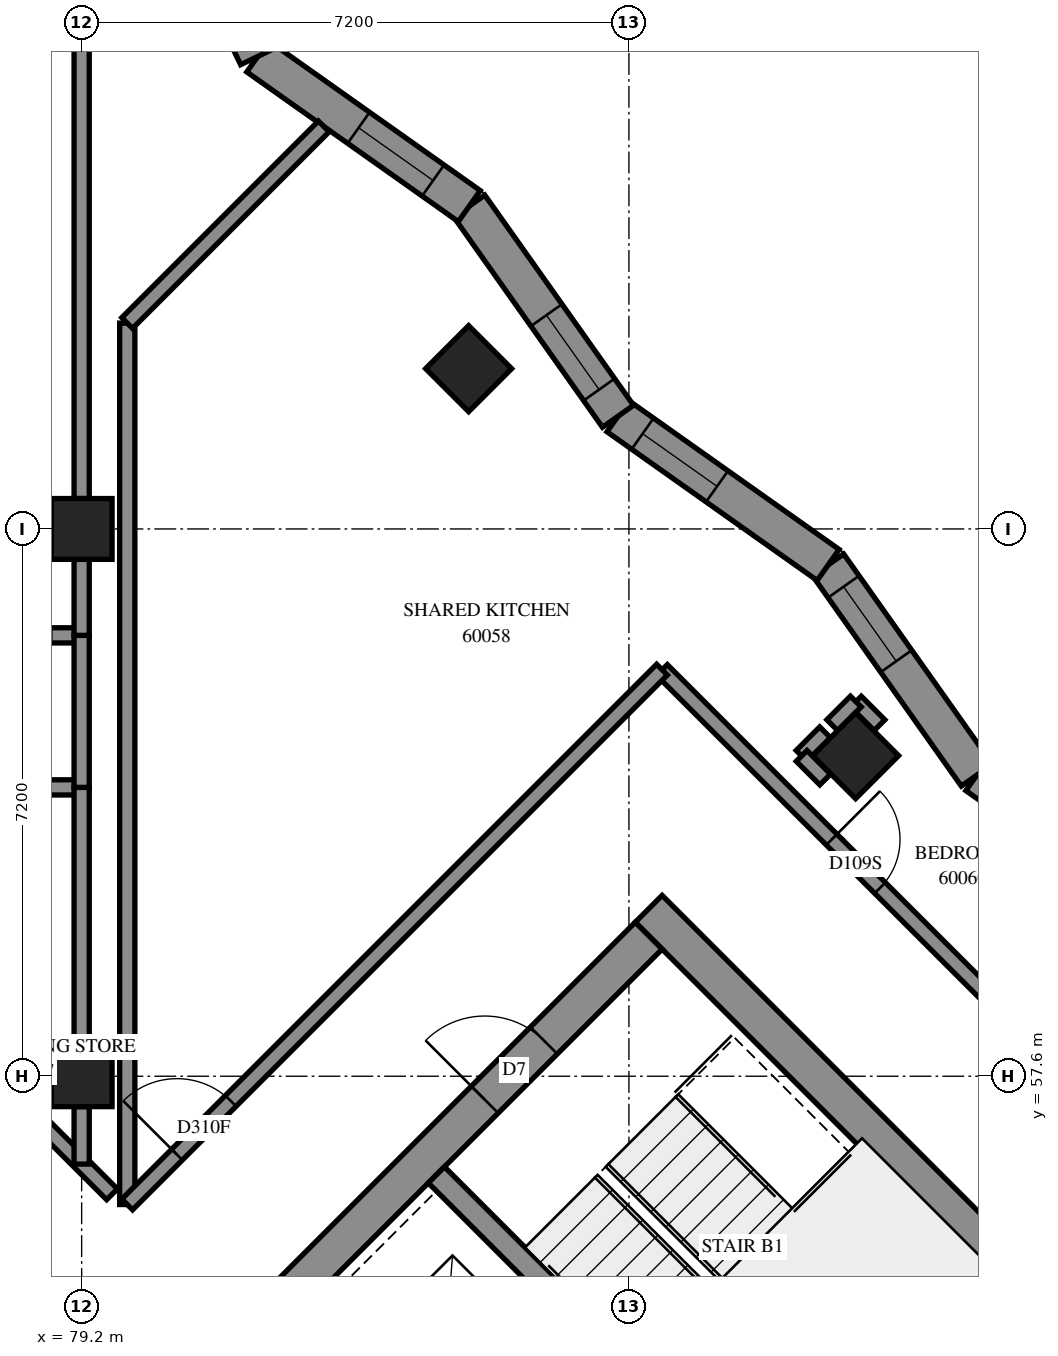
"""IFC4 building model, lengths in metres.
Left out: names, types, materials, properties, quantities, classifications, styles, units other than length and angle.
Written with IfcOpenShell. Run it as: python <this file> out.ifc"""

import sys

from ifc_helpers import new_model, si_unit, direction, frame, frame_2d, origin, origin_2d, place, context, subcontext, project, spatial, polyline, rectangle, outline, extrude, element, fill, save


model = new_model("IFC4")
c1 = context("Model", 3, precision=1e-05, world=origin(), true_north=direction((0.0, 1.0)))
c2 = subcontext(c1, "Body", "Model", "MODEL_VIEW")
j1 = project(units=[si_unit("LENGTHUNIT", "METRE"), si_unit("PLANEANGLEUNIT", "RADIAN")], contexts=[c1])
p1 = place(None, origin())
s1 = spatial("IfcSite", under=j1, at=p1, CompositionType="ELEMENT")
p2 = place(p1, origin())
s2 = spatial("IfcBuilding", under=s1, at=p2, CompositionType="ELEMENT")
p3 = place(p2, frame((0.0, 0.0, 220.2)))
s3 = spatial("IfcBuildingStorey", under=s2, at=p3, CompositionType="ELEMENT", Elevation=220.2)
for number, where, z_axis, x_axis in (
    (1, (79.2, 57.6, 0.0), (0.0, 0.0, 1.0), (1.0, 0.0, 0.0)),
    (2, (79.2, 64.8, 0.0), (0.0, 0.0, 1.0), (1.0, 0.0, 0.0)),
    (3, (84.291, 66.909, 0.0), (0.0, 0.0, 1.0), (0.707, -0.707, 0.0)),
    (4, (89.382, 61.818, 0.0), (0.0, 0.0, 1.0), (0.707, -0.707, 0.0)),
):
    element("IfcColumn", number, at=place(p3, frame(where, z_axis=z_axis, x_axis=x_axis)), inside=s3, PredefinedType="COLUMN", context=c2, shape_type="SweptSolid", body=[
        extrude(rectangle(XDim=0.8, YDim=0.8, at=origin_2d()), origin(), (0.0, 0.0, 1.0), 3.1),
    ])
p4 = place(p3, frame((86.66, 59.802, -0.3), z_axis=(0.0, 0.0, 1.0), x_axis=(0.7071067812, -0.7071067812, 0.0)))
e5 = element("IfcWall", 5, at=p4, inside=s3, PredefinedType="SHEAR", context=c2, shape_type="SweptSolid", body=[
    extrude(rectangle(XDim=15.4, YDim=0.5, at=frame_2d((7.7, 0.0))), origin(), (0.0, 0.0, 1.0), 2.7),
])
p5 = place(p4, frame((10.5, 0.0, 0.3)))
e6 = element("IfcOpeningElement", 6, at=p5, cuts=e5, PredefinedType="OPENING", context=c2, shape_type="SweptSolid", body=[
    extrude(rectangle(XDim=0.8, YDim=2.1, at=frame_2d((0.4, 1.05))), frame((0.0, 0.26, 0.0), z_axis=(0.0, -1.0, 0.0), x_axis=(1.0, 0.0, 0.0)), (0.0, 0.0, 1.0), 0.52),
])
p6 = place(p3, frame((76.478, 49.267, -0.3), z_axis=(0.0, 0.0, 1.0), x_axis=(0.7071067812, 0.7071067812, 0.0)))
e7 = element("IfcWall", 7, at=p6, inside=s3, PredefinedType="SHEAR", context=c2, shape_type="SweptSolid", body=[
    extrude(rectangle(XDim=14.4, YDim=0.5, at=frame_2d((7.2, 0.0))), origin(), (0.0, 0.0, 1.0), 2.7),
])
p7 = place(p6, frame((4.55, 0.0, 0.3)))
e8 = element("IfcOpeningElement", 8, at=p7, cuts=e7, PredefinedType="OPENING", context=c2, shape_type="SweptSolid", body=[
    extrude(rectangle(XDim=1.1, YDim=2.1, at=frame_2d((0.55, 1.05))), frame((0.0, 0.26, 0.0), z_axis=(0.0, -1.0, 0.0), x_axis=(1.0, 0.0, 0.0)), (0.0, 0.0, 1.0), 0.52),
])
p8 = place(p6, frame((11.35, 0.0, 0.3)))
e9 = element("IfcOpeningElement", 9, at=p8, cuts=e7, PredefinedType="OPENING", context=c2, shape_type="SweptSolid", body=[
    extrude(rectangle(XDim=1.1, YDim=2.1, at=frame_2d((0.55, 1.05))), frame((0.0, 0.26, 0.0), z_axis=(0.0, -1.0, 0.0), x_axis=(1.0, 0.0, 0.0)), (0.0, 0.0, 1.0), 0.52),
])
p9 = place(p3, frame((83.867, 56.302, 0.0), z_axis=(0.0, 0.0, 1.0), x_axis=(0.7071137256, -0.7070998367, 0.0)))
e10 = element("IfcWall", 10, at=p9, inside=s3, PredefinedType="SOLIDWALL", context=c2, shape_type="SweptSolid", body=[
    extrude(rectangle(XDim=7.2, YDim=0.3, at=frame_2d((3.6, 0.0))), origin(), (0.0, 0.0, 1.0), 3.1),
])
p10 = place(p3, frame((93.742, 59.605, 0.0), z_axis=(0.0, 0.0, 1.0), x_axis=(-0.8163684441, 0.5775314394, 0.0)))
e11 = element("IfcWall", 11, at=p10, inside=s3, PredefinedType="SOLIDWALL", context=c2, shape_type="SweptSolid", body=[
    extrude(outline(polyline([(-0.043, -0.25), (3.344, -0.25), (3.43, 0.25), (0.043, 0.25), (-0.043, -0.25)])), origin(), (0.0, 0.0, 1.0), 3.1),
])
p11 = place(p10, frame((1.525, 0.0, 0.45)))
e12 = element("IfcOpeningElement", 12, at=p11, cuts=e11, PredefinedType="OPENING", context=c2, shape_type="SweptSolid", body=[
    extrude(rectangle(XDim=1.2, YDim=2.5, at=frame_2d((0.6, 1.25))), frame((0.0, 0.26, 0.0), z_axis=(0.0, -1.0, 0.0), x_axis=(1.0, 0.0, 0.0)), (0.0, 0.0, 1.0), 0.52),
])
p12 = place(p3, frame((90.977, 61.561, 0.0), z_axis=(0.0, 0.0, 1.0), x_axis=(-0.5775371961, 0.8163643715, 0.0)))
e13 = element("IfcWall", 13, at=p12, inside=s3, PredefinedType="SOLIDWALL", context=c2, shape_type="SweptSolid", body=[
    extrude(outline(polyline([(0.043, -0.25), (3.43, -0.25), (3.344, 0.25), (-0.043, 0.25), (0.043, -0.25)])), origin(), (0.0, 0.0, 1.0), 3.1),
])
p13 = place(p12, frame((1.836, 0.0, 0.45)))
e14 = element("IfcOpeningElement", 14, at=p13, cuts=e13, PredefinedType="OPENING", context=c2, shape_type="SweptSolid", body=[
    extrude(rectangle(XDim=1.2, YDim=2.5, at=frame_2d((0.6, 1.25))), frame((0.0, 0.26, 0.0), z_axis=(0.0, -1.0, 0.0), x_axis=(1.0, 0.0, 0.0)), (0.0, 0.0, 1.0), 0.52),
])
p14 = place(p3, frame((89.021, 64.326, 0.0), z_axis=(0.0, 0.0, 1.0), x_axis=(-0.8163684441, 0.5775314394, 0.0)))
e15 = element("IfcWall", 15, at=p14, inside=s3, PredefinedType="SOLIDWALL", context=c2, shape_type="SweptSolid", body=[
    extrude(outline(polyline([(-0.043, -0.25), (3.344, -0.25), (3.43, 0.25), (0.043, 0.25), (-0.043, -0.25)])), origin(), (0.0, 0.0, 1.0), 3.1),
])
p15 = place(p14, frame((1.79, 0.0, 0.45)))
e16 = element("IfcOpeningElement", 16, at=p15, cuts=e15, PredefinedType="OPENING", context=c2, shape_type="SweptSolid", body=[
    extrude(rectangle(XDim=1.2, YDim=2.5, at=frame_2d((0.6, 1.25))), frame((0.0, 0.26, 0.0), z_axis=(0.0, -1.0, 0.0), x_axis=(1.0, 0.0, 0.0)), (0.0, 0.0, 1.0), 0.52),
])
p16 = place(p3, frame((86.256, 66.282, 0.0), z_axis=(0.0, 0.0, 1.0), x_axis=(-0.5775371961, 0.8163643715, 0.0)))
e17 = element("IfcWall", 17, at=p16, inside=s3, PredefinedType="SOLIDWALL", context=c2, shape_type="SweptSolid", body=[
    extrude(outline(polyline([(0.043, -0.25), (3.43, -0.25), (3.344, 0.25), (-0.043, 0.25), (0.043, -0.25)])), origin(), (0.0, 0.0, 1.0), 3.1),
])
p17 = place(p16, frame((0.429, 0.0, 0.45)))
e18 = element("IfcOpeningElement", 18, at=p17, cuts=e17, PredefinedType="OPENING", context=c2, shape_type="SweptSolid", body=[
    extrude(rectangle(XDim=1.2, YDim=2.5, at=frame_2d((0.6, 1.25))), frame((0.0, 0.26, 0.0), z_axis=(0.0, -1.0, 0.0), x_axis=(1.0, 0.0, 0.0)), (0.0, 0.0, 1.0), 0.52),
])
p18 = place(p3, frame((84.3, 69.047, 0.0), z_axis=(0.0, 0.0, 1.0), x_axis=(-0.8163731348, 0.5775248088, 0.0)))
e19 = element("IfcWall", 19, at=p18, inside=s3, PredefinedType="SOLIDWALL", context=c2, shape_type="SweptSolid", body=[
    extrude(outline(polyline([(-0.043, -0.25), (3.344, -0.25), (3.474, 0.25), (0.043, 0.25), (-0.043, -0.25)])), origin(), (0.0, 0.0, 1.0), 3.1),
])
p19 = place(p18, frame((0.584, 0.0, 0.45)))
e20 = element("IfcOpeningElement", 20, at=p19, cuts=e19, PredefinedType="OPENING", context=c2, shape_type="SweptSolid", body=[
    extrude(rectangle(XDim=1.2, YDim=2.5, at=frame_2d((0.6, 1.25))), frame((0.0, 0.26, 0.0), z_axis=(0.0, -1.0, 0.0), x_axis=(1.0, 0.0, 0.0)), (0.0, 0.0, 1.0), 0.52),
])
p20 = place(p3, frame((81.517, 71.016, 0.0), z_axis=(0.0, 0.0, 1.0), x_axis=(-0.4329306404, 0.9014272353, 0.0)))
e21 = element("IfcWall", 21, at=p20, inside=s3, PredefinedType="SOLIDWALL", context=c2, shape_type="SweptSolid", body=[
    extrude(outline(polyline([(0.065, -0.25), (3.603, -0.25), (3.173, 0.25), (-0.065, 0.25), (0.065, -0.25)])), origin(), (0.0, 0.0, 1.0), 3.1),
])
p21 = place(p20, frame((0.737, 0.0, 0.45)))
e22 = element("IfcOpeningElement", 22, at=p21, cuts=e21, PredefinedType="OPENING", context=c2, shape_type="SweptSolid", body=[
    extrude(rectangle(XDim=1.2, YDim=2.5, at=frame_2d((0.6, 1.25))), frame((0.0, 0.26, 0.0), z_axis=(0.0, -1.0, 0.0), x_axis=(1.0, 0.0, 0.0)), (0.0, 0.0, 1.0), 0.52),
])
p22 = place(p3, frame((86.835, 62.945, 0.0), z_axis=(0.0, 0.0, 1.0), x_axis=(0.7072533434, -0.7069601886, 0.0)))
e23 = element("IfcWall", 23, at=p22, inside=s3, PredefinedType="PARTITIONING", context=c2, shape_type="SweptSolid", body=[
    extrude(rectangle(XDim=11.598, YDim=0.2, at=frame_2d((5.799, 0.0))), origin(), (0.0, 0.0, 1.0), 3.1),
])
p23 = place(p22, frame((3.156, 0.0, 0.0)))
e24 = element("IfcOpeningElement", 24, at=p23, cuts=e23, PredefinedType="OPENING", context=c2, shape_type="SweptSolid", body=[
    extrude(rectangle(XDim=0.9, YDim=2.1, at=frame_2d((0.45, 1.05))), frame((0.0, 0.11, 0.0), z_axis=(0.0, -1.0, 0.0), x_axis=(1.0, 0.0, 0.0)), (0.0, 0.0, 1.0), 0.22),
])
p24 = place(p3, frame((79.8, 55.912, 0.0), z_axis=(0.0, 0.0, 1.0), x_axis=(0.0, 1.0, 0.0)))
e25 = element("IfcWall", 25, at=p24, inside=s3, PredefinedType="PARTITIONING", context=c2, shape_type="SweptSolid", body=[
    extrude(rectangle(XDim=11.596, YDim=0.2, at=frame_2d((5.798, 0.0))), origin(), (0.0, 0.0, 1.0), 3.1),
])
p25 = place(p3, frame((79.799, 55.913, 0.0), z_axis=(0.0, 0.0, 1.0), x_axis=(0.7071067812, 0.7071067812, 0.0)))
e26 = element("IfcWall", 26, at=p25, inside=s3, PredefinedType="PARTITIONING", context=c2, shape_type="SweptSolid", body=[
    extrude(rectangle(XDim=9.95, YDim=0.2, at=frame_2d((4.975, 0.0))), origin(), (0.0, 0.0, 1.0), 3.1),
])
p26 = place(p25, frame((0.927, 0.0, 0.0)))
e27 = element("IfcOpeningElement", 27, at=p26, cuts=e26, PredefinedType="OPENING", context=c2, shape_type="SweptSolid", body=[
    extrude(rectangle(XDim=1.0, YDim=2.1, at=frame_2d((0.5, 1.05))), frame((0.0, 0.11, 0.0), z_axis=(0.0, -1.0, 0.0), x_axis=(1.0, 0.0, 0.0)), (0.0, 0.0, 1.0), 0.22),
])
p27 = place(p3, frame((79.2, 65.2, 0.0), z_axis=(0.0, 0.0, 1.0), x_axis=(0.0, 1.0, 0.0)))
e28 = element("IfcWall", 28, at=p27, inside=s3, PredefinedType="PARTITIONING", context=c2, shape_type="SweptSolid", body=[
    extrude(rectangle(XDim=6.4, YDim=0.2, at=frame_2d((3.2, 0.0))), origin(), (0.0, 0.0, 1.0), 3.1),
])
p28 = place(p3, frame((74.246, 61.4, 0.0), z_axis=(0.0, 0.0, 1.0), x_axis=(1.0, 0.0, 0.0)))
e29 = element("IfcWall", 29, at=p28, inside=s3, PredefinedType="PARTITIONING", context=c2, shape_type="SweptSolid", body=[
    extrude(rectangle(XDim=4.954, YDim=0.2, at=frame_2d((2.477, 0.0))), origin(), (0.0, 0.0, 1.0), 3.1),
])
p29 = place(p28, frame((1.17, 0.0, 0.0)))
e30 = element("IfcOpeningElement", 30, at=p29, cuts=e29, PredefinedType="OPENING", context=c2, shape_type="SweptSolid", body=[
    extrude(rectangle(XDim=1.0, YDim=2.1, at=frame_2d((0.5, 1.05))), frame((0.0, 0.11, 0.0), z_axis=(0.0, -1.0, 0.0), x_axis=(1.0, 0.0, 0.0)), (0.0, 0.0, 1.0), 0.22),
])
p30 = place(p3, frame((74.602, 63.4, 0.0), z_axis=(0.0, 0.0, 1.0), x_axis=(1.0, 0.0, 0.0)))
e31 = element("IfcWall", 31, at=p30, inside=s3, PredefinedType="PARTITIONING", context=c2, shape_type="SweptSolid", body=[
    extrude(rectangle(XDim=4.598, YDim=0.2, at=frame_2d((2.299, 0.0))), origin(), (0.0, 0.0, 1.0), 3.1),
])
p31 = place(p30, frame((3.298, 0.0, 0.0)))
e32 = element("IfcOpeningElement", 32, at=p31, cuts=e31, PredefinedType="OPENING", context=c2, shape_type="SweptSolid", body=[
    extrude(rectangle(XDim=0.9, YDim=2.1, at=frame_2d((0.45, 1.05))), frame((0.0, 0.11, 0.0), z_axis=(0.0, -1.0, 0.0), x_axis=(1.0, 0.0, 0.0)), (0.0, 0.0, 1.0), 0.22),
])
p32 = place(p3, frame((76.513, 59.131, 0.0), z_axis=(0.0, 0.0, 1.0), x_axis=(0.7073587997, -0.7068546728, 0.0)))
e33 = element("IfcWall", 33, at=p32, inside=s3, PredefinedType="PARTITIONING", context=c2, shape_type="SweptSolid", body=[
    extrude(rectangle(XDim=4.364, YDim=0.2, at=frame_2d((2.182, 0.0))), origin(), (0.0, 0.0, 1.0), 3.1),
])
p33 = place(p3, frame((79.799, 67.509, 0.0), z_axis=(0.0, 0.0, 1.0), x_axis=(0.7070931116, 0.7071204505, 0.0)))
e34 = element("IfcWall", 34, at=p33, inside=s3, PredefinedType="PARTITIONING", context=c2, shape_type="SweptSolid", body=[
    extrude(rectangle(XDim=3.658, YDim=0.2, at=frame_2d((1.829, 0.0))), origin(), (0.0, 0.0, 1.0), 3.1),
])
p34 = place(p3, frame((79.2, 58.0, 0.0), z_axis=(0.0, 0.0, 1.0), x_axis=(0.0, 1.0, 0.0)))
e35 = element("IfcWall", 35, at=p34, inside=s3, PredefinedType="PARTITIONING", context=c2, shape_type="SweptSolid", body=[
    extrude(rectangle(XDim=3.4, YDim=0.2, at=frame_2d((1.7, 0.0))), origin(), (0.0, 0.0, 1.0), 3.1),
])
p35 = place(p3, frame((79.2, 61.4, 0.0), z_axis=(0.0, 0.0, 1.0), x_axis=(0.0, 1.0, 0.0)))
e36 = element("IfcWall", 36, at=p35, inside=s3, PredefinedType="PARTITIONING", context=c2, shape_type="SweptSolid", body=[
    extrude(rectangle(XDim=2.0, YDim=0.2, at=frame_2d((1.0, 0.0))), origin(), (0.0, 0.0, 1.0), 3.1),
])
p36 = place(p3, frame((79.2, 63.4, 0.0), z_axis=(0.0, 0.0, 1.0), x_axis=(0.0, 1.0, 0.0)))
e37 = element("IfcWall", 37, at=p36, inside=s3, PredefinedType="PARTITIONING", context=c2, shape_type="SweptSolid", body=[
    extrude(rectangle(XDim=1.0, YDim=0.2, at=frame_2d((0.5, 0.0))), origin(), (0.0, 0.0, 1.0), 3.1),
])
p37 = place(p3, frame((79.2, 56.444, 0.0), z_axis=(0.0, 0.0, 1.0), x_axis=(0.0, 1.0, 0.0)))
e38 = element("IfcWall", 38, at=p37, inside=s3, PredefinedType="PARTITIONING", context=c2, shape_type="SweptSolid", body=[
    extrude(rectangle(XDim=0.756, YDim=0.2, at=frame_2d((0.378, 0.0))), origin(), (0.0, 0.0, 1.0), 3.1),
])
for number, where, z_axis, x_axis in (
    (39, (88.671, 61.815, 0.0), (0.0, 0.0, 1.0), (0.707, 0.707, 0.0)),
    (40, (88.672, 61.814, 0.0), (0.0, 0.0, 1.0), (0.707, -0.707, 0.0)),
    (41, (89.386, 62.528, 0.0), (0.0, 0.0, 1.0), (0.707, -0.707, 0.0)),
    (42, (89.075, 62.219, 0.0), (0.0, 0.0, 1.0), (0.707, 0.707, 0.0)),
):
    element("IfcWall", number, at=place(p3, frame(where, z_axis=z_axis, x_axis=x_axis)), inside=s3, PredefinedType="PARTITIONING", context=c2, shape_type="SweptSolid", body=[
        extrude(rectangle(XDim=0.438, YDim=0.2, at=frame_2d((0.219, 0.0))), origin(), (0.0, 0.0, 1.0), 3.1),
    ])
p38 = place(p13, origin())
e43 = element("IfcWindow", 43, at=p38, inside=s3, PartitioningType="SINGLE_PANEL", PredefinedType="WINDOW", context=c2, shape_type="SweptSolid", body=[
    extrude(rectangle(XDim=1.2, YDim=2.5, at=frame_2d((0.6, 1.25))), frame((0.0, 0.18, 0.0), z_axis=(0.0, -1.0, 0.0), x_axis=(1.0, 0.0, 0.0)), (0.0, 0.0, 1.0), 0.06),
])
fill(e14, e43)
p39 = place(p15, origin())
e44 = element("IfcWindow", 44, at=p39, inside=s3, PartitioningType="SINGLE_PANEL", PredefinedType="WINDOW", context=c2, shape_type="SweptSolid", body=[
    extrude(rectangle(XDim=1.2, YDim=2.5, at=frame_2d((0.6, 1.25))), frame((0.0, 0.18, 0.0), z_axis=(0.0, -1.0, 0.0), x_axis=(1.0, 0.0, 0.0)), (0.0, 0.0, 1.0), 0.06),
])
fill(e16, e44)
p40 = place(p17, origin())
e45 = element("IfcWindow", 45, at=p40, inside=s3, PartitioningType="SINGLE_PANEL", PredefinedType="WINDOW", context=c2, shape_type="SweptSolid", body=[
    extrude(rectangle(XDim=1.2, YDim=2.5, at=frame_2d((0.6, 1.25))), frame((0.0, 0.18, 0.0), z_axis=(0.0, -1.0, 0.0), x_axis=(1.0, 0.0, 0.0)), (0.0, 0.0, 1.0), 0.06),
])
fill(e18, e45)
p41 = place(p19, origin())
e46 = element("IfcWindow", 46, at=p41, inside=s3, PartitioningType="SINGLE_PANEL", PredefinedType="WINDOW", context=c2, shape_type="SweptSolid", body=[
    extrude(rectangle(XDim=1.2, YDim=2.5, at=frame_2d((0.6, 1.25))), frame((0.0, 0.18, 0.0), z_axis=(0.0, -1.0, 0.0), x_axis=(1.0, 0.0, 0.0)), (0.0, 0.0, 1.0), 0.06),
])
fill(e20, e46)
p42 = place(p8, origin())
e47 = element("IfcDoor", 47, at=p42, inside=s3, OperationType="SINGLE_SWING_LEFT", PredefinedType="DOOR", context=c2, shape_type="SweptSolid", body=[
    extrude(rectangle(XDim=1.1, YDim=2.1, at=frame_2d((0.55, 1.05))), frame((0.0, 0.025, 0.0), z_axis=(0.0, -1.0, 0.0), x_axis=(1.0, 0.0, 0.0)), (0.0, 0.0, 1.0), 0.05),
])
fill(e9, e47)
p43 = place(p26, origin())
e48 = element("IfcDoor", 48, at=p43, inside=s3, OperationType="SINGLE_SWING_RIGHT", PredefinedType="DOOR", context=c2, shape_type="SweptSolid", body=[
    extrude(rectangle(XDim=1.0, YDim=2.1, at=frame_2d((0.5, 1.05))), frame((0.0, 0.025, 0.0), z_axis=(0.0, -1.0, 0.0), x_axis=(1.0, 0.0, 0.0)), (0.0, 0.0, 1.0), 0.05),
])
fill(e27, e48)
p44 = place(p23, origin())
e49 = element("IfcDoor", 49, at=p44, inside=s3, OperationType="SINGLE_SWING_LEFT", PredefinedType="DOOR", context=c2, shape_type="SweptSolid", body=[
    extrude(rectangle(XDim=0.9, YDim=2.1, at=frame_2d((0.45, 1.05))), frame((0.0, 0.025, 0.0), z_axis=(0.0, -1.0, 0.0), x_axis=(1.0, 0.0, 0.0)), (0.0, 0.0, 1.0), 0.05),
])
fill(e24, e49)
save(model, sys.argv[1])
